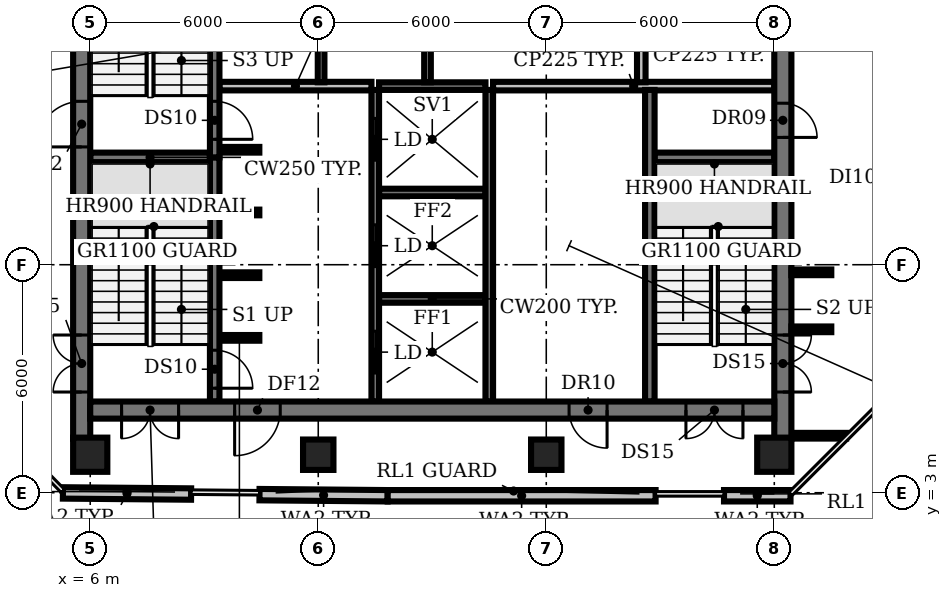
"""IFC4 building model, lengths in metres.
Left out: names, types, materials, properties, quantities, classifications, styles, units other than length and angle.
Written with IfcOpenShell. Run it as: python <this file> out.ifc"""

import sys

from ifc_helpers import new_model, si_unit, direction, frame, frame_2d, origin, origin_2d, place, context, subcontext, project, spatial, rectangle, circle, extrude, element, fill, save


model = new_model("IFC4")
c1 = context("Model", 3, precision=1e-05, world=origin(), true_north=direction((0.0, 1.0)))
c2 = subcontext(c1, "Body", "Model", "MODEL_VIEW")
j1 = project(units=[si_unit("LENGTHUNIT", "METRE"), si_unit("PLANEANGLEUNIT", "RADIAN")], contexts=[c1])
p1 = place(None, origin())
s1 = spatial("IfcSite", under=j1, at=p1, CompositionType="ELEMENT")
p2 = place(p1, origin())
s2 = spatial("IfcBuilding", under=s1, at=p2, CompositionType="ELEMENT")
p3 = place(p2, frame((0.0, 0.0, 230.6)))
s3 = spatial("IfcBuildingStorey", under=s2, at=p3, CompositionType="ELEMENT", Elevation=230.6)
p4 = place(p3, frame((6.0, 4.0, 0.0), z_axis=(0.0, 0.0, 1.0), x_axis=(1.0, 0.0, 0.0)))
e1 = element("IfcColumn", 1, at=p4, inside=s3, PredefinedType="COLUMN", context=c2, shape_type="SweptSolid", body=[
    extrude(circle(Radius=0.45, at=origin_2d()), origin(), (0.0, 0.0, 1.0), 3.85),
])
for number, where, z_axis, x_axis in (
    (2, (12.0, 4.0, 0.0), (0.0, 0.0, 1.0), (1.0, 0.0, 0.0)),
    (3, (18.0, 4.0, 0.0), (0.0, 0.0, 1.0), (1.0, 0.0, 0.0)),
):
    element("IfcColumn", number, at=place(p3, frame(where, z_axis=z_axis, x_axis=x_axis)), inside=s3, PredefinedType="COLUMN", context=c2, shape_type="SweptSolid", body=[
        extrude(rectangle(XDim=0.8, YDim=0.8, at=origin_2d()), origin(), (0.0, 0.0, 1.0), 3.85),
    ])
p5 = place(p3, frame((24.0, 4.0, 0.0), z_axis=(0.0, 0.0, 1.0), x_axis=(1.0, 0.0, 0.0)))
e4 = element("IfcColumn", 4, at=p5, inside=s3, PredefinedType="COLUMN", context=c2, shape_type="SweptSolid", body=[
    extrude(circle(Radius=0.45, at=origin_2d()), origin(), (0.0, 0.0, 1.0), 3.85),
])
p6 = place(p3, frame((5.281, 2.995, 0.0), z_axis=(0.0, 0.0, 1.0), x_axis=(0.999962277007, -0.008685882971, 0.0)))
e5 = element("IfcWall", 5, at=p6, inside=s3, PredefinedType="SOLIDWALL", context=c2, shape_type="SweptSolid", body=[
    extrude(rectangle(XDim=3.373, YDim=0.3, at=frame_2d((1.687, 0.0))), origin(), (0.0, 0.0, 1.0), 3.85),
])
p7 = place(p3, frame((10.454, 2.949, 0.0), z_axis=(0.0, 0.0, 1.0), x_axis=(0.999961640154, -0.008758893764, 0.0)))
e6 = element("IfcWall", 6, at=p7, inside=s3, PredefinedType="SOLIDWALL", context=c2, shape_type="SweptSolid", body=[
    extrude(rectangle(XDim=3.373, YDim=0.3, at=frame_2d((1.687, 0.0))), origin(), (0.0, 0.0, 1.0), 3.85),
])
p8 = place(p3, frame((13.827, 2.92, 0.0), z_axis=(0.0, 0.0, 1.0), x_axis=(1.0, 0.0, 0.0)))
e7 = element("IfcWall", 7, at=p8, inside=s3, PredefinedType="SOLIDWALL", context=c2, shape_type="SweptSolid", body=[
    extrude(rectangle(XDim=7.05, YDim=0.3, at=frame_2d((3.525, 0.0))), origin(), (0.0, 0.0, 1.0), 3.85),
])
p9 = place(p3, frame((22.677, 2.92, 0.0), z_axis=(0.0, 0.0, 1.0), x_axis=(1.0, 0.0, 0.0)))
e8 = element("IfcWall", 8, at=p9, inside=s3, PredefinedType="SOLIDWALL", context=c2, shape_type="SweptSolid", body=[
    extrude(rectangle(XDim=1.75, YDim=0.3, at=frame_2d((0.875, 0.0))), origin(), (0.0, 0.0, 1.0), 3.85),
])
p10 = place(p3, frame((9.4, 7.075, 0.0), z_axis=(0.0, 0.0, 1.0), x_axis=(1.0, 0.0, 0.0)))
e9 = element("IfcWall", 9, at=p10, inside=s3, PredefinedType="SHEAR", context=c2, shape_type="SweptSolid", body=[
    extrude(rectangle(XDim=1.05, YDim=0.15, at=frame_2d((0.525, 0.0))), origin(), (0.0, 0.0, 1.0), 3.85),
])
p11 = place(p3, frame((13.6, 8.1, 0.0), z_axis=(0.0, 0.0, 1.0), x_axis=(1.0, 0.0, 0.0)))
e10 = element("IfcWall", 10, at=p11, inside=s3, PredefinedType="SHEAR", context=c2, shape_type="SweptSolid", body=[
    extrude(rectangle(XDim=2.8, YDim=0.2, at=frame_2d((1.4, 0.0))), origin(), (0.0, 0.0, 1.0), 3.85),
])
for number, where, z_axis, x_axis in (
    (11, (9.4, 8.725, 0.0), (0.0, 0.0, 1.0), (1.0, 0.0, 0.0)),
    (12, (9.4, 10.375, 0.0), (0.0, 0.0, 1.0), (1.0, 0.0, 0.0)),
):
    element("IfcWall", number, at=place(p3, frame(where, z_axis=z_axis, x_axis=x_axis)), inside=s3, PredefinedType="SHEAR", context=c2, shape_type="SweptSolid", body=[
        extrude(rectangle(XDim=1.05, YDim=0.15, at=frame_2d((0.525, 0.0))), origin(), (0.0, 0.0, 1.0), 3.85),
    ])
p12 = place(p3, frame((13.6, 10.9, 0.0), z_axis=(0.0, 0.0, 1.0), x_axis=(1.0, 0.0, 0.0)))
e13 = element("IfcWall", 13, at=p12, inside=s3, PredefinedType="SHEAR", context=c2, shape_type="SweptSolid", body=[
    extrude(rectangle(XDim=2.8, YDim=0.2, at=frame_2d((1.4, 0.0))), origin(), (0.0, 0.0, 1.0), 3.85),
])
for number, where, z_axis, x_axis in (
    (14, (6.0, 11.825, 0.0), (0.0, 0.0, 1.0), (1.0, 0.0, 0.0)),
    (15, (20.85, 11.825, 0.0), (0.0, 0.0, 1.0), (1.0, 0.0, 0.0)),
):
    element("IfcWall", number, at=place(p3, frame(where, z_axis=z_axis, x_axis=x_axis)), inside=s3, PredefinedType="SHEAR", context=c2, shape_type="SweptSolid", body=[
        extrude(rectangle(XDim=3.15, YDim=0.25, at=frame_2d((1.575, 0.0))), origin(), (0.0, 0.0, 1.0), 3.85),
    ])
p13 = place(p3, frame((9.4, 12.025, 0.0), z_axis=(0.0, 0.0, 1.0), x_axis=(1.0, 0.0, 0.0)))
e16 = element("IfcWall", 16, at=p13, inside=s3, PredefinedType="SHEAR", context=c2, shape_type="SweptSolid", body=[
    extrude(rectangle(XDim=1.05, YDim=0.15, at=frame_2d((0.525, 0.0))), origin(), (0.0, 0.0, 1.0), 3.85),
])
p14 = place(p3, frame((9.4, 13.7, 0.0), z_axis=(0.0, 0.0, 1.0), x_axis=(1.0, 0.0, 0.0)))
e17 = element("IfcWall", 17, at=p14, inside=s3, PredefinedType="PARTITIONING", context=c2, shape_type="SweptSolid", body=[
    extrude(rectangle(XDim=4.0, YDim=0.225, at=frame_2d((2.0, 0.0))), origin(), (0.0, 0.0, 1.0), 3.85),
])
p15 = place(p3, frame((13.6, 13.7, 0.0), z_axis=(0.0, 0.0, 1.0), x_axis=(1.0, 0.0, 0.0)))
e18 = element("IfcWall", 18, at=p15, inside=s3, PredefinedType="SHEAR", context=c2, shape_type="SweptSolid", body=[
    extrude(rectangle(XDim=2.8, YDim=0.2, at=frame_2d((1.4, 0.0))), origin(), (0.0, 0.0, 1.0), 3.85),
])
p16 = place(p3, frame((16.6, 13.7, 0.0), z_axis=(0.0, 0.0, 1.0), x_axis=(1.0, 0.0, 0.0)))
e19 = element("IfcWall", 19, at=p16, inside=s3, PredefinedType="PARTITIONING", context=c2, shape_type="SweptSolid", body=[
    extrude(rectangle(XDim=7.4, YDim=0.225, at=frame_2d((3.7, 0.0))), origin(), (0.0, 0.0, 1.0), 3.85),
])
p17 = place(p3, frame((9.275, 11.825, 0.0), z_axis=(0.0, 0.0, 1.0), x_axis=(0.0, -1.0, 0.0)))
e20 = element("IfcWall", 20, at=p17, inside=s3, PredefinedType="SHEAR", context=c2, shape_type="SweptSolid", body=[
    extrude(rectangle(XDim=6.425, YDim=0.25, at=frame_2d((3.212, 0.0))), origin(), (0.0, 0.0, 1.0), 3.85),
])
p18 = place(p17, frame((5.075, 0.0, 0.0)))
e21 = element("IfcOpeningElement", 21, at=p18, cuts=e20, PredefinedType="OPENING", context=c2, shape_type="SweptSolid", body=[
    extrude(rectangle(XDim=1.0, YDim=2.1, at=frame_2d((0.5, 1.05))), frame((0.0, 0.135, 0.0), z_axis=(0.0, -1.0, 0.0), x_axis=(1.0, 0.0, 0.0)), (0.0, 0.0, 1.0), 0.27),
])
p19 = place(p3, frame((9.275, 18.375, 0.0), z_axis=(0.0, 0.0, 1.0), x_axis=(0.0, -1.0, 0.0)))
e22 = element("IfcWall", 22, at=p19, inside=s3, PredefinedType="SHEAR", context=c2, shape_type="SweptSolid", body=[
    extrude(rectangle(XDim=6.55, YDim=0.25, at=frame_2d((3.275, 0.0))), origin(), (0.0, 0.0, 1.0), 3.85),
])
p20 = place(p19, frame((5.075, 0.0, 0.0)))
e23 = element("IfcOpeningElement", 23, at=p20, cuts=e22, PredefinedType="OPENING", context=c2, shape_type="SweptSolid", body=[
    extrude(rectangle(XDim=1.0, YDim=2.1, at=frame_2d((0.5, 1.05))), frame((0.0, 0.135, 0.0), z_axis=(0.0, -1.0, 0.0), x_axis=(1.0, 0.0, 0.0)), (0.0, 0.0, 1.0), 0.27),
])
p21 = place(p3, frame((12.075, 13.8, 0.0), z_axis=(0.0, 0.0, 1.0), x_axis=(0.0, 1.0, 0.0)))
e24 = element("IfcWall", 24, at=p21, inside=s3, PredefinedType="PARTITIONING", context=c2, shape_type="SweptSolid", body=[
    extrude(rectangle(XDim=2.6, YDim=0.175, at=frame_2d((1.3, 0.0))), origin(), (0.0, 0.0, 1.0), 3.85),
])
p22 = place(p3, frame((13.5, 5.4, 0.0), z_axis=(0.0, 0.0, 1.0), x_axis=(0.0, 1.0, 0.0)))
e25 = element("IfcWall", 25, at=p22, inside=s3, PredefinedType="SHEAR", context=c2, shape_type="SweptSolid", body=[
    extrude(rectangle(XDim=8.2, YDim=0.2, at=frame_2d((4.1, 0.0))), origin(), (0.0, 0.0, 1.0), 3.85),
])
p23 = place(p22, frame((0.75, 0.0, 0.0)))
e26 = element("IfcOpeningElement", 26, at=p23, cuts=e25, PredefinedType="OPENING", context=c2, shape_type="SweptSolid", body=[
    extrude(rectangle(XDim=1.1, YDim=2.1, at=frame_2d((0.55, 1.05))), frame((0.0, 0.11, 0.0), z_axis=(0.0, -1.0, 0.0), x_axis=(1.0, 0.0, 0.0)), (0.0, 0.0, 1.0), 0.22),
])
p24 = place(p22, frame((3.55, 0.0, 0.0)))
e27 = element("IfcOpeningElement", 27, at=p24, cuts=e25, PredefinedType="OPENING", context=c2, shape_type="SweptSolid", body=[
    extrude(rectangle(XDim=1.1, YDim=2.1, at=frame_2d((0.55, 1.05))), frame((0.0, 0.11, 0.0), z_axis=(0.0, -1.0, 0.0), x_axis=(1.0, 0.0, 0.0)), (0.0, 0.0, 1.0), 0.22),
])
p25 = place(p22, frame((6.35, 0.0, 0.0)))
e28 = element("IfcOpeningElement", 28, at=p25, cuts=e25, PredefinedType="OPENING", context=c2, shape_type="SweptSolid", body=[
    extrude(rectangle(XDim=1.1, YDim=2.1, at=frame_2d((0.55, 1.05))), frame((0.0, 0.11, 0.0), z_axis=(0.0, -1.0, 0.0), x_axis=(1.0, 0.0, 0.0)), (0.0, 0.0, 1.0), 0.22),
])
p26 = place(p3, frame((14.875, 13.8, 0.0), z_axis=(0.0, 0.0, 1.0), x_axis=(0.0, 1.0, 0.0)))
e29 = element("IfcWall", 29, at=p26, inside=s3, PredefinedType="PARTITIONING", context=c2, shape_type="SweptSolid", body=[
    extrude(rectangle(XDim=2.6, YDim=0.175, at=frame_2d((1.3, 0.0))), origin(), (0.0, 0.0, 1.0), 3.85),
])
p27 = place(p3, frame((16.5, 5.4, 0.0), z_axis=(0.0, 0.0, 1.0), x_axis=(0.0, 1.0, 0.0)))
e30 = element("IfcWall", 30, at=p27, inside=s3, PredefinedType="SHEAR", context=c2, shape_type="SweptSolid", body=[
    extrude(rectangle(XDim=8.2, YDim=0.2, at=frame_2d((4.1, 0.0))), origin(), (0.0, 0.0, 1.0), 3.85),
])
p28 = place(p3, frame((20.5, 13.8, 0.0), z_axis=(0.0, 0.0, 1.0), x_axis=(0.0, 1.0, 0.0)))
e31 = element("IfcWall", 31, at=p28, inside=s3, PredefinedType="PARTITIONING", context=c2, shape_type="SweptSolid", body=[
    extrude(rectangle(XDim=2.6, YDim=0.225, at=frame_2d((1.3, 0.0))), origin(), (0.0, 0.0, 1.0), 3.85),
])
p29 = place(p3, frame((20.725, 5.4, 0.0), z_axis=(0.0, 0.0, 1.0), x_axis=(0.0, 1.0, 0.0)))
e32 = element("IfcWall", 32, at=p29, inside=s3, PredefinedType="SHEAR", context=c2, shape_type="SweptSolid", body=[
    extrude(rectangle(XDim=8.2, YDim=0.25, at=frame_2d((4.1, 0.0))), origin(), (0.0, 0.0, 1.0), 3.85),
])
p30 = place(p3, frame((5.775, 4.42, 0.0), z_axis=(0.0, 0.0, 1.0), x_axis=(0.0, 1.0, 0.0)))
e33 = element("IfcWall", 33, at=p30, inside=s3, PredefinedType="SHEAR", context=c2, shape_type="SweptSolid", body=[
    extrude(rectangle(XDim=20.83, YDim=0.45, at=frame_2d((10.415, 0.0))), origin(), (0.0, 0.0, 1.0), 3.85),
])
p31 = place(p30, frame((1.23, 0.0, 0.0)))
e34 = element("IfcOpeningElement", 34, at=p31, cuts=e33, PredefinedType="OPENING", context=c2, shape_type="SweptSolid", body=[
    extrude(rectangle(XDim=1.5, YDim=2.1, at=frame_2d((0.75, 1.05))), frame((0.0, 0.235, 0.0), z_axis=(0.0, -1.0, 0.0), x_axis=(1.0, 0.0, 0.0)), (0.0, 0.0, 1.0), 0.47),
])
p32 = place(p30, frame((7.68, 0.0, 0.0)))
e35 = element("IfcOpeningElement", 35, at=p32, cuts=e33, PredefinedType="OPENING", context=c2, shape_type="SweptSolid", body=[
    extrude(rectangle(XDim=1.2, YDim=2.1, at=frame_2d((0.6, 1.05))), frame((0.0, 0.235, 0.0), z_axis=(0.0, -1.0, 0.0), x_axis=(1.0, 0.0, 0.0)), (0.0, 0.0, 1.0), 0.47),
])
p33 = place(p30, frame((14.23, 0.0, 0.0)))
e36 = element("IfcOpeningElement", 36, at=p33, cuts=e33, PredefinedType="OPENING", context=c2, shape_type="SweptSolid", body=[
    extrude(rectangle(XDim=1.2, YDim=2.1, at=frame_2d((0.6, 1.05))), frame((0.0, 0.235, 0.0), z_axis=(0.0, -1.0, 0.0), x_axis=(1.0, 0.0, 0.0)), (0.0, 0.0, 1.0), 0.47),
])
p34 = place(p3, frame((24.225, 25.25, 0.0), z_axis=(0.0, 0.0, 1.0), x_axis=(0.0, -1.0, 0.0)))
e37 = element("IfcWall", 37, at=p34, inside=s3, PredefinedType="SHEAR", context=c2, shape_type="SweptSolid", body=[
    extrude(rectangle(XDim=20.83, YDim=0.45, at=frame_2d((10.415, 0.0))), origin(), (0.0, 0.0, 1.0), 3.85),
])
p35 = place(p34, frame((18.1, 0.0, 0.0)))
e38 = element("IfcOpeningElement", 38, at=p35, cuts=e37, PredefinedType="OPENING", context=c2, shape_type="SweptSolid", body=[
    extrude(rectangle(XDim=1.5, YDim=2.1, at=frame_2d((0.75, 1.05))), frame((0.0, 0.235, 0.0), z_axis=(0.0, -1.0, 0.0), x_axis=(1.0, 0.0, 0.0)), (0.0, 0.0, 1.0), 0.47),
])
p36 = place(p34, frame((12.0, 0.0, 0.0)))
e39 = element("IfcOpeningElement", 39, at=p36, cuts=e37, PredefinedType="OPENING", context=c2, shape_type="SweptSolid", body=[
    extrude(rectangle(XDim=0.9, YDim=2.1, at=frame_2d((0.45, 1.05))), frame((0.0, 0.235, 0.0), z_axis=(0.0, -1.0, 0.0), x_axis=(1.0, 0.0, 0.0)), (0.0, 0.0, 1.0), 0.47),
])
p37 = place(p34, frame((6.0, 0.0, 0.0)))
e40 = element("IfcOpeningElement", 40, at=p37, cuts=e37, PredefinedType="OPENING", context=c2, shape_type="SweptSolid", body=[
    extrude(rectangle(XDim=2.0, YDim=2.1, at=frame_2d((1.0, 1.05))), frame((0.0, 0.235, 0.0), z_axis=(0.0, -1.0, 0.0), x_axis=(1.0, 0.0, 0.0)), (0.0, 0.0, 1.0), 0.47),
])
p38 = place(p3, frame((24.0, 5.175, 0.0), z_axis=(0.0, 0.0, 1.0), x_axis=(-1.0, 0.0, 0.0)))
e41 = element("IfcWall", 41, at=p38, inside=s3, PredefinedType="SHEAR", context=c2, shape_type="SweptSolid", body=[
    extrude(rectangle(XDim=18.0, YDim=0.45, at=frame_2d((9.0, 0.0))), origin(), (0.0, 0.0, 1.0), 3.85),
])
p39 = place(p38, frame((0.825, 0.0, 0.0)))
e42 = element("IfcOpeningElement", 42, at=p39, cuts=e41, PredefinedType="OPENING", context=c2, shape_type="SweptSolid", body=[
    extrude(rectangle(XDim=1.5, YDim=2.1, at=frame_2d((0.75, 1.05))), frame((0.0, 0.235, 0.0), z_axis=(0.0, -1.0, 0.0), x_axis=(1.0, 0.0, 0.0)), (0.0, 0.0, 1.0), 0.47),
])
p40 = place(p38, frame((15.675, 0.0, 0.0)))
e43 = element("IfcOpeningElement", 43, at=p40, cuts=e41, PredefinedType="OPENING", context=c2, shape_type="SweptSolid", body=[
    extrude(rectangle(XDim=1.5, YDim=2.1, at=frame_2d((0.75, 1.05))), frame((0.0, 0.235, 0.0), z_axis=(0.0, -1.0, 0.0), x_axis=(1.0, 0.0, 0.0)), (0.0, 0.0, 1.0), 0.47),
])
p41 = place(p38, frame((13.0, 0.0, 0.0)))
e44 = element("IfcOpeningElement", 44, at=p41, cuts=e41, PredefinedType="OPENING", context=c2, shape_type="SweptSolid", body=[
    extrude(rectangle(XDim=1.2, YDim=2.1, at=frame_2d((0.6, 1.05))), frame((0.0, 0.235, 0.0), z_axis=(0.0, -1.0, 0.0), x_axis=(1.0, 0.0, 0.0)), (0.0, 0.0, 1.0), 0.47),
])
p42 = place(p38, frame((4.4, 0.0, 0.0)))
e45 = element("IfcOpeningElement", 45, at=p42, cuts=e41, PredefinedType="OPENING", context=c2, shape_type="SweptSolid", body=[
    extrude(rectangle(XDim=1.0, YDim=2.1, at=frame_2d((0.5, 1.05))), frame((0.0, 0.235, 0.0), z_axis=(0.0, -1.0, 0.0), x_axis=(1.0, 0.0, 0.0)), (0.0, 0.0, 1.0), 0.47),
])
for number, where, z_axis, x_axis in (
    (46, (24.45, 7.3, 0.0), (0.0, 0.0, 1.0), (1.0, 0.0, 0.0)),
    (47, (24.45, 8.8, 0.0), (0.0, 0.0, 1.0), (1.0, 0.0, 0.0)),
):
    element("IfcWall", number, at=place(p3, frame(where, z_axis=z_axis, x_axis=x_axis)), inside=s3, PredefinedType="PARTITIONING", context=c2, shape_type="SweptSolid", body=[
        extrude(rectangle(XDim=1.05, YDim=0.15, at=frame_2d((0.525, 0.0))), origin(), (0.0, 0.0, 1.0), 2.88),
    ])
p43 = place(p3, frame((24.55, 4.5, 0.0), z_axis=(0.0, 0.0, 1.0), x_axis=(1.0, 0.0, 0.0)))
e48 = element("IfcWall", 48, at=p43, inside=s3, PredefinedType="PARTITIONING", context=c2, shape_type="SweptSolid", body=[
    extrude(rectangle(XDim=1.34, YDim=0.15, at=frame_2d((0.67, 0.0))), origin(), (0.0, 0.0, 1.0), 2.88),
])
p44 = place(p18, origin())
e49 = element("IfcDoor", 49, at=p44, inside=s3, OperationType="SINGLE_SWING_RIGHT", PredefinedType="DOOR", context=c2, shape_type="SweptSolid", body=[
    extrude(rectangle(XDim=1.0, YDim=2.1, at=frame_2d((0.5, 1.05))), frame((0.0, 0.025, 0.0), z_axis=(0.0, -1.0, 0.0), x_axis=(1.0, 0.0, 0.0)), (0.0, 0.0, 1.0), 0.05),
])
fill(e21, e49)
p45 = place(p20, origin())
e50 = element("IfcDoor", 50, at=p45, inside=s3, OperationType="SINGLE_SWING_RIGHT", PredefinedType="DOOR", context=c2, shape_type="SweptSolid", body=[
    extrude(rectangle(XDim=1.0, YDim=2.1, at=frame_2d((0.5, 1.05))), frame((0.0, 0.025, 0.0), z_axis=(0.0, -1.0, 0.0), x_axis=(1.0, 0.0, 0.0)), (0.0, 0.0, 1.0), 0.05),
])
fill(e23, e50)
p46 = place(p23, origin())
e51 = element("IfcDoor", 51, at=p46, inside=s3, OperationType="DOUBLE_DOOR_SLIDING", PredefinedType="DOOR", context=c2, shape_type="SweptSolid", body=[
    extrude(rectangle(XDim=1.1, YDim=2.1, at=frame_2d((0.55, 1.05))), frame((0.0, 0.025, 0.0), z_axis=(0.0, -1.0, 0.0), x_axis=(1.0, 0.0, 0.0)), (0.0, 0.0, 1.0), 0.05),
])
fill(e26, e51)
p47 = place(p24, origin())
e52 = element("IfcDoor", 52, at=p47, inside=s3, OperationType="DOUBLE_DOOR_SLIDING", PredefinedType="DOOR", context=c2, shape_type="SweptSolid", body=[
    extrude(rectangle(XDim=1.1, YDim=2.1, at=frame_2d((0.55, 1.05))), frame((0.0, 0.025, 0.0), z_axis=(0.0, -1.0, 0.0), x_axis=(1.0, 0.0, 0.0)), (0.0, 0.0, 1.0), 0.05),
])
fill(e27, e52)
p48 = place(p25, origin())
e53 = element("IfcDoor", 53, at=p48, inside=s3, OperationType="DOUBLE_DOOR_SLIDING", PredefinedType="DOOR", context=c2, shape_type="SweptSolid", body=[
    extrude(rectangle(XDim=1.1, YDim=2.1, at=frame_2d((0.55, 1.05))), frame((0.0, 0.025, 0.0), z_axis=(0.0, -1.0, 0.0), x_axis=(1.0, 0.0, 0.0)), (0.0, 0.0, 1.0), 0.05),
])
fill(e28, e53)
p49 = place(p31, origin())
e54 = element("IfcDoor", 54, at=p49, inside=s3, OperationType="DOUBLE_DOOR_SINGLE_SWING", PredefinedType="DOOR", context=c2, shape_type="SweptSolid", body=[
    extrude(rectangle(XDim=1.5, YDim=2.1, at=frame_2d((0.75, 1.05))), frame((0.0, 0.025, 0.0), z_axis=(0.0, -1.0, 0.0), x_axis=(1.0, 0.0, 0.0)), (0.0, 0.0, 1.0), 0.05),
])
fill(e34, e54)
p50 = place(p32, origin())
e55 = element("IfcDoor", 55, at=p50, inside=s3, OperationType="SINGLE_SWING_LEFT", PredefinedType="DOOR", context=c2, shape_type="SweptSolid", body=[
    extrude(rectangle(XDim=1.2, YDim=2.1, at=frame_2d((0.6, 1.05))), frame((0.0, 0.025, 0.0), z_axis=(0.0, -1.0, 0.0), x_axis=(1.0, 0.0, 0.0)), (0.0, 0.0, 1.0), 0.05),
])
fill(e35, e55)
p51 = place(p35, origin())
e56 = element("IfcDoor", 56, at=p51, inside=s3, OperationType="DOUBLE_DOOR_SINGLE_SWING", PredefinedType="DOOR", context=c2, shape_type="SweptSolid", body=[
    extrude(rectangle(XDim=1.5, YDim=2.1, at=frame_2d((0.75, 1.05))), frame((0.0, 0.025, 0.0), z_axis=(0.0, -1.0, 0.0), x_axis=(1.0, 0.0, 0.0)), (0.0, 0.0, 1.0), 0.05),
])
fill(e38, e56)
p52 = place(p36, origin())
e57 = element("IfcDoor", 57, at=p52, inside=s3, OperationType="SINGLE_SWING_RIGHT", PredefinedType="DOOR", context=c2, shape_type="SweptSolid", body=[
    extrude(rectangle(XDim=0.9, YDim=2.1, at=frame_2d((0.45, 1.05))), frame((0.0, 0.025, 0.0), z_axis=(0.0, -1.0, 0.0), x_axis=(1.0, 0.0, 0.0)), (0.0, 0.0, 1.0), 0.05),
])
fill(e39, e57)
p53 = place(p39, origin())
e58 = element("IfcDoor", 58, at=p53, inside=s3, OperationType="DOUBLE_DOOR_SINGLE_SWING", PredefinedType="DOOR", context=c2, shape_type="SweptSolid", body=[
    extrude(rectangle(XDim=1.5, YDim=2.1, at=frame_2d((0.75, 1.05))), frame((0.0, 0.025, 0.0), z_axis=(0.0, -1.0, 0.0), x_axis=(1.0, 0.0, 0.0)), (0.0, 0.0, 1.0), 0.05),
])
fill(e42, e58)
p54 = place(p40, origin())
e59 = element("IfcDoor", 59, at=p54, inside=s3, OperationType="DOUBLE_DOOR_SINGLE_SWING", PredefinedType="DOOR", context=c2, shape_type="SweptSolid", body=[
    extrude(rectangle(XDim=1.5, YDim=2.1, at=frame_2d((0.75, 1.05))), frame((0.0, 0.025, 0.0), z_axis=(0.0, -1.0, 0.0), x_axis=(1.0, 0.0, 0.0)), (0.0, 0.0, 1.0), 0.05),
])
fill(e43, e59)
p55 = place(p41, origin())
e60 = element("IfcDoor", 60, at=p55, inside=s3, OperationType="SINGLE_SWING_RIGHT", PredefinedType="DOOR", context=c2, shape_type="SweptSolid", body=[
    extrude(rectangle(XDim=1.2, YDim=2.1, at=frame_2d((0.6, 1.05))), frame((0.0, 0.025, 0.0), z_axis=(0.0, -1.0, 0.0), x_axis=(1.0, 0.0, 0.0)), (0.0, 0.0, 1.0), 0.05),
])
fill(e44, e60)
p56 = place(p42, origin())
e61 = element("IfcDoor", 61, at=p56, inside=s3, OperationType="SINGLE_SWING_LEFT", PredefinedType="DOOR", context=c2, shape_type="SweptSolid", body=[
    extrude(rectangle(XDim=1.0, YDim=2.1, at=frame_2d((0.5, 1.05))), frame((0.0, 0.025, 0.0), z_axis=(0.0, -1.0, 0.0), x_axis=(1.0, 0.0, 0.0)), (0.0, 0.0, 1.0), 0.05),
])
fill(e45, e61)
save(model, sys.argv[1])
